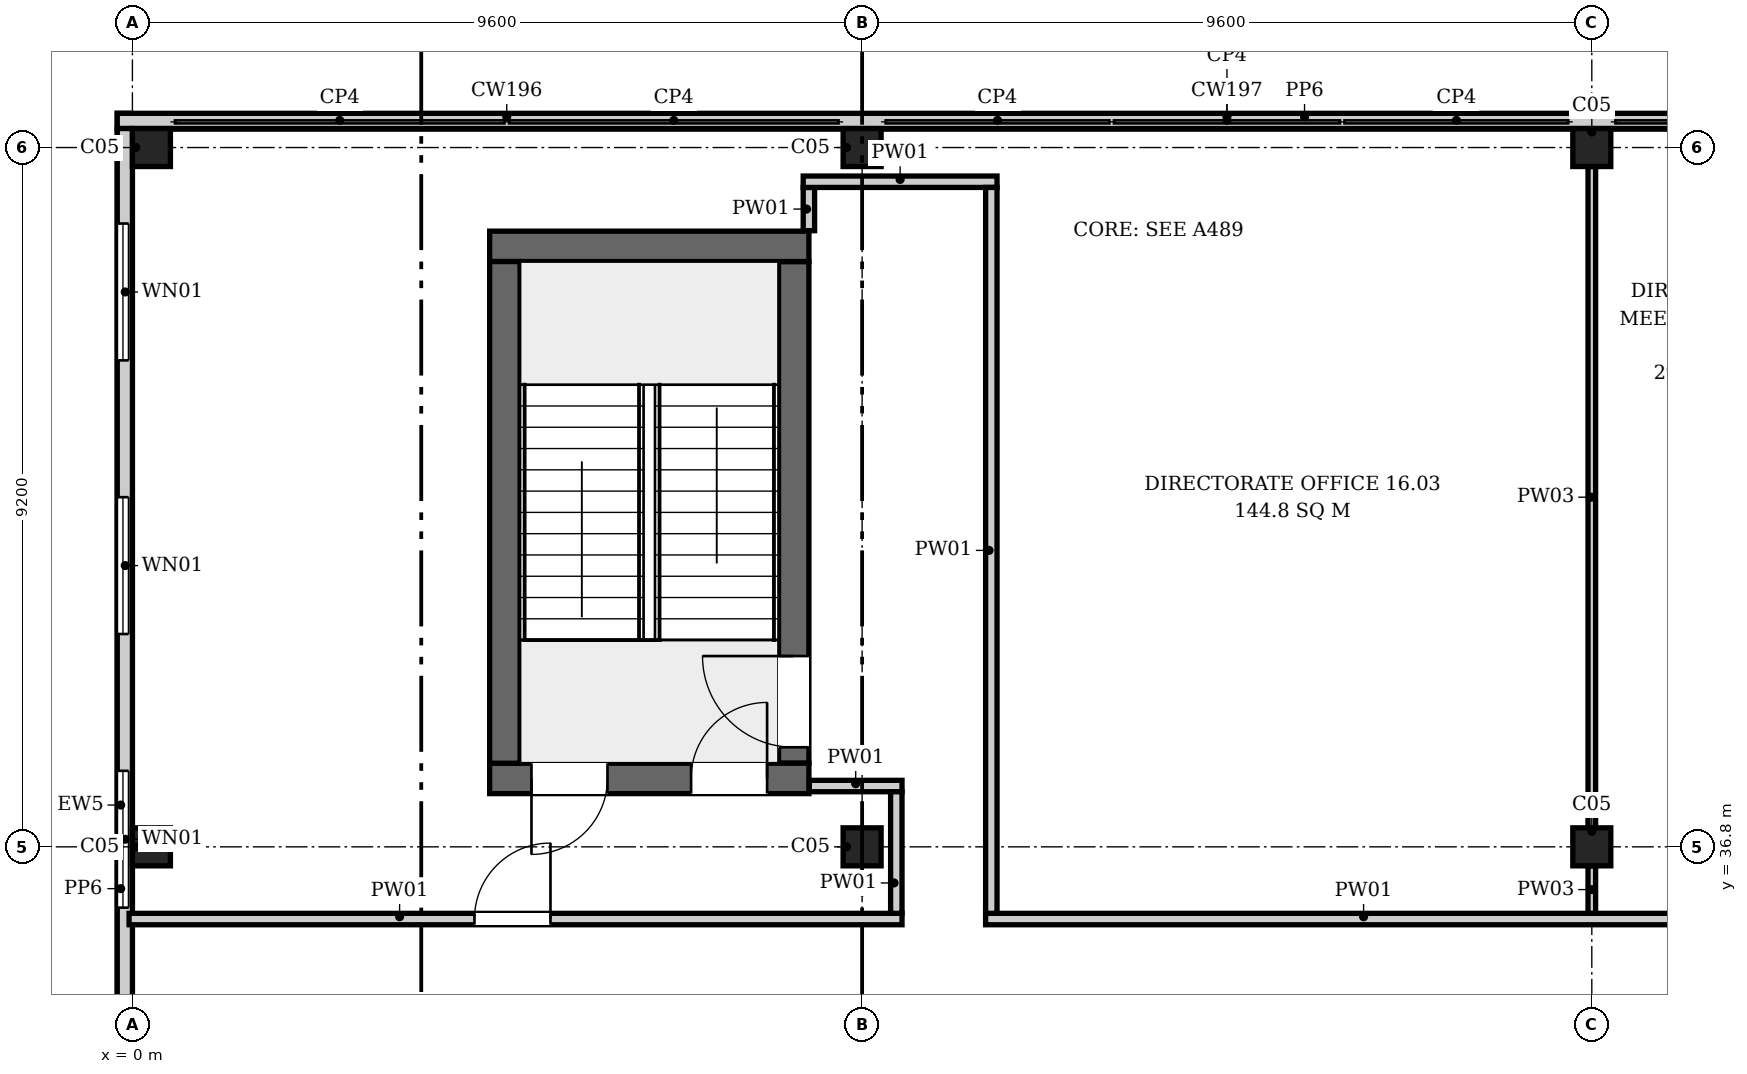
"""IFC4 building model, lengths in metres.
Left out: names, types, materials, properties, quantities, classifications, styles, units other than length and angle.
Written with IfcOpenShell. Run it as: python <this file> out.ifc"""

import sys

from ifc_helpers import new_model, si_unit, direction, frame, frame_2d, origin, origin_2d, place, context, subcontext, project, spatial, rectangle, extrude, element, fill, save


model = new_model("IFC4")
c1 = context("Model", 3, precision=1e-05, world=origin(), true_north=direction((0.0, 1.0)))
c2 = subcontext(c1, "Body", "Model", "MODEL_VIEW")
j1 = project(units=[si_unit("LENGTHUNIT", "METRE"), si_unit("PLANEANGLEUNIT", "RADIAN")], contexts=[c1])
p1 = place(None, origin())
s1 = spatial("IfcSite", under=j1, at=p1, CompositionType="ELEMENT")
p2 = place(p1, origin())
s2 = spatial("IfcBuilding", under=s1, at=p2, CompositionType="ELEMENT")
p3 = place(p2, frame((0.0, 0.0, 78.1)))
s3 = spatial("IfcBuildingStorey", under=s2, at=p3, CompositionType="ELEMENT", Elevation=78.1)
p4 = place(p3, frame((4.7, 37.7, 0.0), z_axis=(0.0, 0.0, 1.0), x_axis=(1.0, 0.0, 0.0)))
e1 = element("IfcWall", 1, at=p4, inside=s3, PredefinedType="SHEAR", context=c2, shape_type="SweptSolid", body=[
    extrude(rectangle(XDim=4.2, YDim=0.4, at=frame_2d((2.1, 0.0))), origin(), (0.0, 0.0, 1.0), 7.1),
])
p5 = place(p4, frame((0.55, 0.0, 4.2)))
e2 = element("IfcOpeningElement", 2, at=p5, cuts=e1, PredefinedType="OPENING", context=c2, shape_type="SweptSolid", body=[
    extrude(rectangle(XDim=1.0, YDim=2.1, at=frame_2d((0.5, 1.05))), frame((0.0, 0.21, 0.0), z_axis=(0.0, -1.0, 0.0), x_axis=(1.0, 0.0, 0.0)), (0.0, 0.0, 1.0), 0.42),
])
p6 = place(p4, frame((2.65, 0.0, 4.2)))
e3 = element("IfcOpeningElement", 3, at=p6, cuts=e1, PredefinedType="OPENING", context=c2, shape_type="SweptSolid", body=[
    extrude(rectangle(XDim=1.0, YDim=2.1, at=frame_2d((0.5, 1.05))), frame((0.0, 0.21, 0.0), z_axis=(0.0, -1.0, 0.0), x_axis=(1.0, 0.0, 0.0)), (0.0, 0.0, 1.0), 0.42),
])
p7 = place(p3, frame((4.7, 44.7, 0.0), z_axis=(0.0, 0.0, 1.0), x_axis=(1.0, 0.0, 0.0)))
e4 = element("IfcWall", 4, at=p7, inside=s3, PredefinedType="SHEAR", context=c2, shape_type="SweptSolid", body=[
    extrude(rectangle(XDim=4.2, YDim=0.4, at=frame_2d((2.1, 0.0))), origin(), (0.0, 0.0, 1.0), 7.1),
])
p8 = place(p3, frame((4.9, 37.9, 0.0), z_axis=(0.0, 0.0, 1.0), x_axis=(0.0, 1.0, 0.0)))
e5 = element("IfcWall", 5, at=p8, inside=s3, PredefinedType="SHEAR", context=c2, shape_type="SweptSolid", body=[
    extrude(rectangle(XDim=6.6, YDim=0.4, at=frame_2d((3.3, 0.0))), origin(), (0.0, 0.0, 1.0), 7.1),
])
p9 = place(p3, frame((8.7, 37.9, 0.0), z_axis=(0.0, 0.0, 1.0), x_axis=(0.0, 1.0, 0.0)))
e6 = element("IfcWall", 6, at=p9, inside=s3, PredefinedType="SHEAR", context=c2, shape_type="SweptSolid", body=[
    extrude(rectangle(XDim=6.6, YDim=0.4, at=frame_2d((3.3, 0.0))), origin(), (0.0, 0.0, 1.0), 7.1),
])
p10 = place(p9, frame((0.21, 0.0, 0.0)))
e7 = element("IfcOpeningElement", 7, at=p10, cuts=e6, PredefinedType="OPENING", context=c2, shape_type="SweptSolid", body=[
    extrude(rectangle(XDim=1.2, YDim=2.1, at=frame_2d((0.6, 1.05))), frame((0.0, 0.21, 0.0), z_axis=(0.0, -1.0, 0.0), x_axis=(1.0, 0.0, 0.0)), (0.0, 0.0, 1.0), 0.42),
])
for number, where, z_axis, x_axis in (
    (8, (0.25, 36.8, 0.0), (0.0, 0.0, 1.0), (1.0, 0.0, 0.0)),
    (9, (9.6, 36.8, 0.0), (0.0, 0.0, 1.0), (1.0, 0.0, 0.0)),
    (10, (19.2, 36.8, 0.0), (0.0, 0.0, 1.0), (1.0, 0.0, 0.0)),
    (11, (0.25, 46.0, 0.0), (0.0, 0.0, 1.0), (1.0, 0.0, 0.0)),
    (12, (9.6, 46.0, 0.0), (0.0, 0.0, 1.0), (1.0, 0.0, 0.0)),
    (13, (19.2, 46.0, 0.0), (0.0, 0.0, 1.0), (1.0, 0.0, 0.0)),
):
    element("IfcColumn", number, at=place(p3, frame(where, z_axis=z_axis, x_axis=x_axis)), inside=s3, PredefinedType="COLUMN", context=c2, shape_type="SweptSolid", body=[
        extrude(rectangle(XDim=0.5, YDim=0.5, at=origin_2d()), origin(), (0.0, 0.0, 1.0), 3.9),
    ])
p11 = place(p3, frame((-0.125, 46.45, 0.0), z_axis=(0.0, 0.0, 1.0), x_axis=(0.0, -1.0, 0.0)))
e14 = element("IfcWall", 14, at=p11, inside=s3, PredefinedType="ELEMENTEDWALL", context=c2, shape_type="SweptSolid", body=[
    extrude(rectangle(XDim=19.3, YDim=0.15, at=frame_2d((9.65, 0.0))), origin(), (0.0, 0.0, 1.0), 3.9),
])
p12 = place(p11, frame((15.85, 0.0, 0.9)))
e15 = element("IfcOpeningElement", 15, at=p12, cuts=e14, PredefinedType="OPENING", context=c2, shape_type="SweptSolid", body=[
    extrude(rectangle(XDim=1.8, YDim=2.6, at=frame_2d((0.9, 1.3))), frame((0.0, 0.085, 0.0), z_axis=(0.0, -1.0, 0.0), x_axis=(1.0, 0.0, 0.0)), (0.0, 0.0, 1.0), 0.17),
])
p13 = place(p11, frame((12.25, 0.0, 0.9)))
e16 = element("IfcOpeningElement", 16, at=p13, cuts=e14, PredefinedType="OPENING", context=c2, shape_type="SweptSolid", body=[
    extrude(rectangle(XDim=1.8, YDim=2.6, at=frame_2d((0.9, 1.3))), frame((0.0, 0.085, 0.0), z_axis=(0.0, -1.0, 0.0), x_axis=(1.0, 0.0, 0.0)), (0.0, 0.0, 1.0), 0.17),
])
p14 = place(p11, frame((8.65, 0.0, 0.9)))
e17 = element("IfcOpeningElement", 17, at=p14, cuts=e14, PredefinedType="OPENING", context=c2, shape_type="SweptSolid", body=[
    extrude(rectangle(XDim=1.8, YDim=2.6, at=frame_2d((0.9, 1.3))), frame((0.0, 0.085, 0.0), z_axis=(0.0, -1.0, 0.0), x_axis=(1.0, 0.0, 0.0)), (0.0, 0.0, 1.0), 0.17),
])
p15 = place(p11, frame((5.05, 0.0, 0.9)))
e18 = element("IfcOpeningElement", 18, at=p15, cuts=e14, PredefinedType="OPENING", context=c2, shape_type="SweptSolid", body=[
    extrude(rectangle(XDim=1.8, YDim=2.6, at=frame_2d((0.9, 1.3))), frame((0.0, 0.085, 0.0), z_axis=(0.0, -1.0, 0.0), x_axis=(1.0, 0.0, 0.0)), (0.0, 0.0, 1.0), 0.17),
])
p16 = place(p11, frame((1.45, 0.0, 0.9)))
e19 = element("IfcOpeningElement", 19, at=p16, cuts=e14, PredefinedType="OPENING", context=c2, shape_type="SweptSolid", body=[
    extrude(rectangle(XDim=1.8, YDim=2.6, at=frame_2d((0.9, 1.3))), frame((0.0, 0.085, 0.0), z_axis=(0.0, -1.0, 0.0), x_axis=(1.0, 0.0, 0.0)), (0.0, 0.0, 1.0), 0.17),
])
p17 = place(p3, frame((38.851, 46.35, 4.2), z_axis=(0.0, 0.0, 1.0), x_axis=(-1.0, 0.0, 0.0)))
e20 = element("IfcWall", 20, at=p17, inside=s3, PredefinedType="PARAPET", context=c2, shape_type="SweptSolid", body=[
    extrude(rectangle(XDim=39.05, YDim=0.2, at=frame_2d((19.525, 0.0))), origin(), (0.0, 0.0, 1.0), 1.1),
])
p18 = place(p3, frame((-0.099, 46.25, 4.2), z_axis=(0.0, 0.0, 1.0), x_axis=(0.0, -1.0, 0.0)))
e21 = element("IfcWall", 21, at=p18, inside=s3, PredefinedType="PARAPET", context=c2, shape_type="SweptSolid", body=[
    extrude(rectangle(XDim=18.9, YDim=0.2, at=frame_2d((9.45, 0.0))), origin(), (0.0, 0.0, 1.0), 1.1),
])
p19 = place(p3, frame((-0.044, 35.85, 0.0), z_axis=(0.0, 0.0, 1.0), x_axis=(1.0, 0.0, 0.0)))
e22 = element("IfcWall", 22, at=p19, inside=s3, PredefinedType="PARTITIONING", context=c2, shape_type="SweptSolid", body=[
    extrude(rectangle(XDim=10.169, YDim=0.15, at=frame_2d((5.084, 0.0))), origin(), (0.0, 0.0, 1.0), 3.9),
])
p20 = place(p19, frame((4.544, 0.0, 0.0)))
e23 = element("IfcOpeningElement", 23, at=p20, cuts=e22, PredefinedType="OPENING", context=c2, shape_type="SweptSolid", body=[
    extrude(rectangle(XDim=1.0, YDim=2.1, at=frame_2d((0.5, 1.05))), frame((0.0, 0.085, 0.0), z_axis=(0.0, -1.0, 0.0), x_axis=(1.0, 0.0, 0.0)), (0.0, 0.0, 1.0), 0.17),
])
p21 = place(p3, frame((8.9, 44.906, 0.0), z_axis=(0.0, 0.0, 1.0), x_axis=(0.0, 1.0, 0.0)))
e24 = element("IfcWall", 24, at=p21, inside=s3, PredefinedType="PARTITIONING", context=c2, shape_type="SweptSolid", body=[
    extrude(rectangle(XDim=0.569, YDim=0.15, at=frame_2d((0.285, 0.0))), origin(), (0.0, 0.0, 1.0), 3.9),
])
p22 = place(p3, frame((8.825, 45.55, 0.0), z_axis=(0.0, 0.0, 1.0), x_axis=(1.0, 0.0, 0.0)))
e25 = element("IfcWall", 25, at=p22, inside=s3, PredefinedType="PARTITIONING", context=c2, shape_type="SweptSolid", body=[
    extrude(rectangle(XDim=2.55, YDim=0.15, at=frame_2d((1.275, 0.0))), origin(), (0.0, 0.0, 1.0), 3.9),
])
p23 = place(p3, frame((8.906, 37.6, 0.0), z_axis=(0.0, 0.0, 1.0), x_axis=(1.0, 0.0, 0.0)))
e26 = element("IfcWall", 26, at=p23, inside=s3, PredefinedType="PARTITIONING", context=c2, shape_type="SweptSolid", body=[
    extrude(rectangle(XDim=1.219, YDim=0.15, at=frame_2d((0.609, 0.0))), origin(), (0.0, 0.0, 1.0), 3.9),
])
p24 = place(p3, frame((10.05, 35.925, 0.0), z_axis=(0.0, 0.0, 1.0), x_axis=(0.0, 1.0, 0.0)))
e27 = element("IfcWall", 27, at=p24, inside=s3, PredefinedType="PARTITIONING", context=c2, shape_type="SweptSolid", body=[
    extrude(rectangle(XDim=1.6, YDim=0.15, at=frame_2d((0.8, 0.0))), origin(), (0.0, 0.0, 1.0), 3.9),
])
p25 = place(p3, frame((11.225, 35.85, 0.0), z_axis=(0.0, 0.0, 1.0), x_axis=(1.0, 0.0, 0.0)))
e28 = element("IfcWall", 28, at=p25, inside=s3, PredefinedType="PARTITIONING", context=c2, shape_type="SweptSolid", body=[
    extrude(rectangle(XDim=11.05, YDim=0.15, at=frame_2d((5.525, 0.0))), origin(), (0.0, 0.0, 1.0), 3.9),
])
p26 = place(p3, frame((11.3, 35.925, 0.0), z_axis=(0.0, 0.0, 1.0), x_axis=(0.0, 1.0, 0.0)))
e29 = element("IfcWall", 29, at=p26, inside=s3, PredefinedType="PARTITIONING", context=c2, shape_type="SweptSolid", body=[
    extrude(rectangle(XDim=9.55, YDim=0.15, at=frame_2d((4.775, 0.0))), origin(), (0.0, 0.0, 1.0), 3.9),
])
p27 = place(p3, frame((19.2, 35.925, 0.0), z_axis=(0.0, 0.0, 1.0), x_axis=(0.0, 1.0, 0.0)))
e30 = element("IfcWall", 30, at=p27, inside=s3, PredefinedType="PARTITIONING", context=c2, shape_type="SweptSolid", body=[
    extrude(rectangle(XDim=0.625, YDim=0.1, at=frame_2d((0.312, 0.0))), origin(), (0.0, 0.0, 1.0), 3.9),
])
p28 = place(p3, frame((19.2, 37.05, 0.0), z_axis=(0.0, 0.0, 1.0), x_axis=(0.0, 1.0, 0.0)))
e31 = element("IfcWall", 31, at=p28, inside=s3, PredefinedType="PARTITIONING", context=c2, shape_type="SweptSolid", body=[
    extrude(rectangle(XDim=8.7, YDim=0.1, at=frame_2d((4.35, 0.0))), origin(), (0.0, 0.0, 1.0), 3.9),
])
p29 = place(p14, origin())
e32 = element("IfcWindow", 32, at=p29, inside=s3, PartitioningType="SINGLE_PANEL", PredefinedType="WINDOW", context=c2, shape_type="SweptSolid", body=[
    extrude(rectangle(XDim=1.8, YDim=2.6, at=frame_2d((0.9, 1.3))), frame((0.0, 0.03, 0.0), z_axis=(0.0, -1.0, 0.0), x_axis=(1.0, 0.0, 0.0)), (0.0, 0.0, 1.0), 0.06),
])
fill(e17, e32)
p30 = place(p15, origin())
e33 = element("IfcWindow", 33, at=p30, inside=s3, PartitioningType="SINGLE_PANEL", PredefinedType="WINDOW", context=c2, shape_type="SweptSolid", body=[
    extrude(rectangle(XDim=1.8, YDim=2.6, at=frame_2d((0.9, 1.3))), frame((0.0, 0.03, 0.0), z_axis=(0.0, -1.0, 0.0), x_axis=(1.0, 0.0, 0.0)), (0.0, 0.0, 1.0), 0.06),
])
fill(e18, e33)
p31 = place(p16, origin())
e34 = element("IfcWindow", 34, at=p31, inside=s3, PartitioningType="SINGLE_PANEL", PredefinedType="WINDOW", context=c2, shape_type="SweptSolid", body=[
    extrude(rectangle(XDim=1.8, YDim=2.6, at=frame_2d((0.9, 1.3))), frame((0.0, 0.03, 0.0), z_axis=(0.0, -1.0, 0.0), x_axis=(1.0, 0.0, 0.0)), (0.0, 0.0, 1.0), 0.06),
])
fill(e19, e34)
p32 = place(p10, origin())
e35 = element("IfcDoor", 35, at=p32, inside=s3, OperationType="SINGLE_SWING_RIGHT", PredefinedType="DOOR", context=c2, shape_type="SweptSolid", body=[
    extrude(rectangle(XDim=1.2, YDim=2.1, at=frame_2d((0.6, 1.05))), frame((0.0, 0.025, 0.0), z_axis=(0.0, -1.0, 0.0), x_axis=(1.0, 0.0, 0.0)), (0.0, 0.0, 1.0), 0.05),
])
fill(e7, e35)
p33 = place(p5, frame((1.0, 0.0, 0.0), z_axis=(0.0, 0.0, 1.0), x_axis=(-1.0, 0.0, 0.0)))
e36 = element("IfcDoor", 36, at=p33, inside=s3, OperationType="SINGLE_SWING_LEFT", PredefinedType="DOOR", context=c2, shape_type="SweptSolid", body=[
    extrude(rectangle(XDim=1.0, YDim=2.1, at=frame_2d((0.5, 1.05))), frame((0.0, 0.025, 0.0), z_axis=(0.0, -1.0, 0.0), x_axis=(1.0, 0.0, 0.0)), (0.0, 0.0, 1.0), 0.05),
])
fill(e2, e36)
p34 = place(p6, frame((1.0, 0.0, 0.0), z_axis=(0.0, 0.0, 1.0), x_axis=(-1.0, 0.0, 0.0)))
e37 = element("IfcDoor", 37, at=p34, inside=s3, OperationType="SINGLE_SWING_RIGHT", PredefinedType="DOOR", context=c2, shape_type="SweptSolid", body=[
    extrude(rectangle(XDim=1.0, YDim=2.1, at=frame_2d((0.5, 1.05))), frame((0.0, 0.025, 0.0), z_axis=(0.0, -1.0, 0.0), x_axis=(1.0, 0.0, 0.0)), (0.0, 0.0, 1.0), 0.05),
])
fill(e3, e37)
p35 = place(p20, origin())
e38 = element("IfcDoor", 38, at=p35, inside=s3, OperationType="SINGLE_SWING_LEFT", PredefinedType="DOOR", context=c2, shape_type="SweptSolid", body=[
    extrude(rectangle(XDim=1.0, YDim=2.1, at=frame_2d((0.5, 1.05))), frame((0.0, 0.025, 0.0), z_axis=(0.0, -1.0, 0.0), x_axis=(1.0, 0.0, 0.0)), (0.0, 0.0, 1.0), 0.05),
])
fill(e23, e38)
save(model, sys.argv[1])
